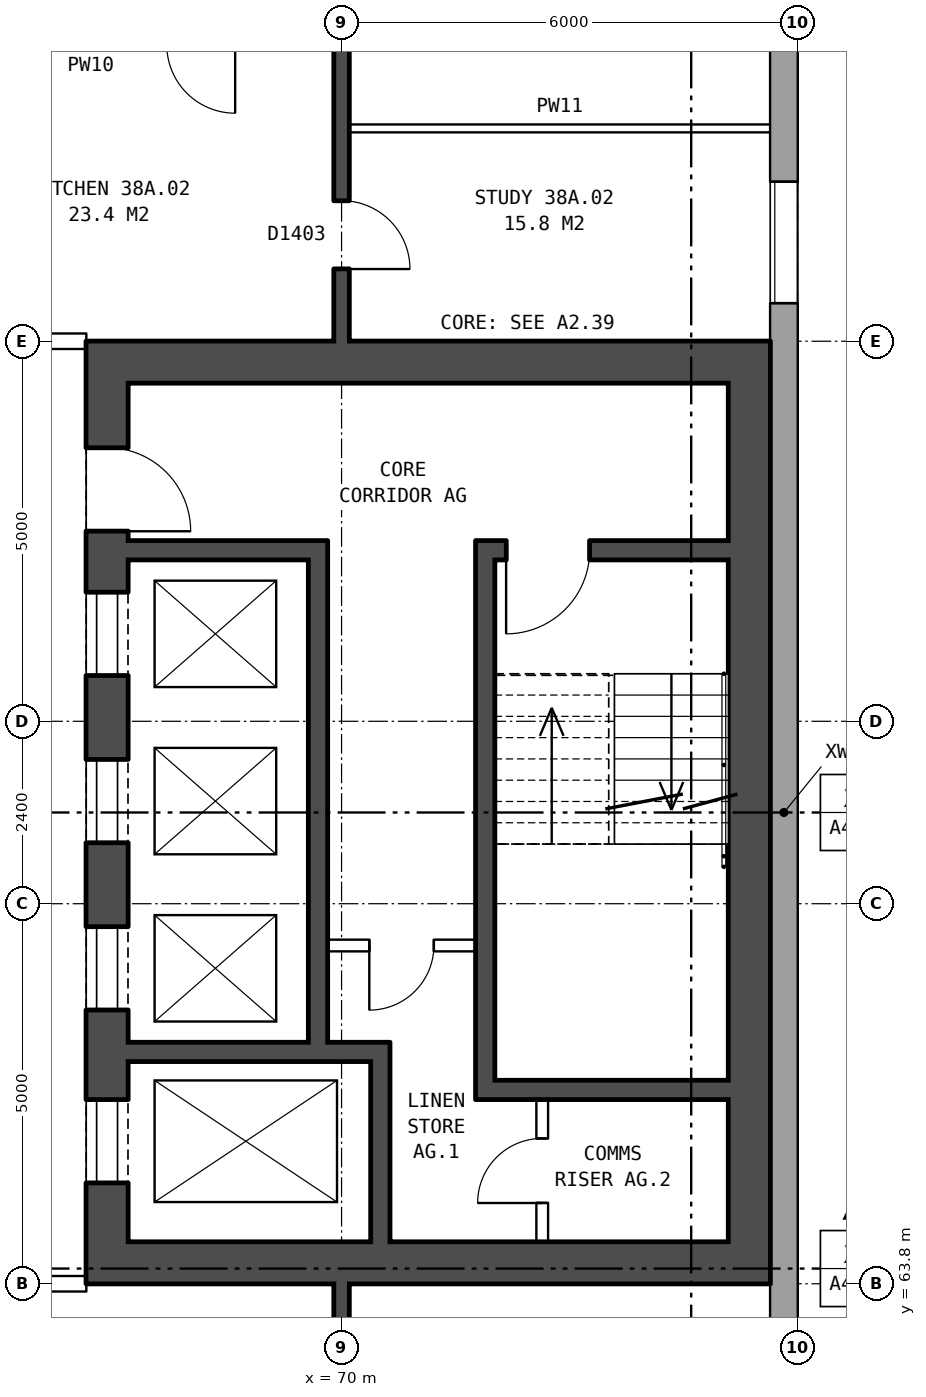
"""IFC4 building model, lengths in metres.
Left out: names, types, materials, properties, quantities, classifications, styles, units other than length and angle.
Written with IfcOpenShell. Run it as: python <this file> out.ifc"""

import sys

from ifc_helpers import new_model, si_unit, direction, frame, frame_2d, origin, place, context, subcontext, project, spatial, rectangle, extrude, element, fill, save


model = new_model("IFC4")
c1 = context("Model", 3, precision=1e-05, world=origin(), true_north=direction((0.0, 1.0)))
c2 = subcontext(c1, "Body", "Model", "MODEL_VIEW")
j1 = project(units=[si_unit("LENGTHUNIT", "METRE"), si_unit("PLANEANGLEUNIT", "RADIAN")], contexts=[c1])
p1 = place(None, origin())
s1 = spatial("IfcSite", under=j1, at=p1, CompositionType="ELEMENT")
p2 = place(p1, origin())
s2 = spatial("IfcBuilding", under=s1, at=p2, CompositionType="ELEMENT")
p3 = place(p2, frame((0.0, 0.0, 136.1)))
s3 = spatial("IfcBuildingStorey", under=s2, at=p3, CompositionType="ELEMENT", Elevation=136.1)
p4 = place(p3, frame((75.82, 57.075, 0.0), z_axis=(0.0, 0.0, 1.0), x_axis=(0.0, 1.0, 0.0)))
e1 = element("IfcWall", 1, at=p4, inside=s3, PredefinedType="STANDARD", context=c2, shape_type="SweptSolid", body=[
    extrude(rectangle(XDim=25.851, YDim=0.36, at=frame_2d((12.925, 0.0))), origin(), (0.0, 0.0, 1.0), 2.85),
])
p5 = place(p4, frame((1.075, 0.0, 0.8)))
e2 = element("IfcOpeningElement", 2, at=p5, cuts=e1, PredefinedType="OPENING", context=c2, shape_type="SweptSolid", body=[
    extrude(rectangle(XDim=1.2, YDim=1.2, at=frame_2d((0.6, 0.6))), frame((0.0, 0.19, 0.0), z_axis=(0.0, -1.0, 0.0), x_axis=(1.0, 0.0, 0.0)), (0.0, 0.0, 1.0), 0.38),
])
p6 = place(p4, frame((4.625, 0.0, 0.8)))
e3 = element("IfcOpeningElement", 3, at=p6, cuts=e1, PredefinedType="OPENING", context=c2, shape_type="SweptSolid", body=[
    extrude(rectangle(XDim=1.6, YDim=1.8, at=frame_2d((0.8, 0.9))), frame((0.0, 0.19, 0.0), z_axis=(0.0, -1.0, 0.0), x_axis=(1.0, 0.0, 0.0)), (0.0, 0.0, 1.0), 0.38),
])
p7 = place(p4, frame((19.625, 0.0, 0.8)))
e4 = element("IfcOpeningElement", 4, at=p7, cuts=e1, PredefinedType="OPENING", context=c2, shape_type="SweptSolid", body=[
    extrude(rectangle(XDim=1.6, YDim=1.8, at=frame_2d((0.8, 0.9))), frame((0.0, 0.19, 0.0), z_axis=(0.0, -1.0, 0.0), x_axis=(1.0, 0.0, 0.0)), (0.0, 0.0, 1.0), 0.38),
])
p8 = place(p4, frame((23.125, 0.0, 0.8)))
e5 = element("IfcOpeningElement", 5, at=p8, cuts=e1, PredefinedType="OPENING", context=c2, shape_type="SweptSolid", body=[
    extrude(rectangle(XDim=1.0, YDim=0.9, at=frame_2d((0.5, 0.45))), frame((0.0, 0.19, 0.0), z_axis=(0.0, -1.0, 0.0), x_axis=(1.0, 0.0, 0.0)), (0.0, 0.0, 1.0), 0.38),
])
p9 = place(p4, frame((3.675, 0.0, 1.7)))
e6 = element("IfcOpeningElement", 6, at=p9, cuts=e1, PredefinedType="OPENING", context=c2, shape_type="SweptSolid", body=[
    extrude(rectangle(XDim=0.6, YDim=0.9, at=frame_2d((0.3, 0.45))), frame((0.0, 0.19, 0.0), z_axis=(0.0, -1.0, 0.0), x_axis=(1.0, 0.0, 0.0)), (0.0, 0.0, 1.0), 0.38),
])
p10 = place(p4, frame((24.425, 0.0, 0.8)))
e7 = element("IfcOpeningElement", 7, at=p10, cuts=e1, PredefinedType="OPENING", context=c2, shape_type="SweptSolid", body=[
    extrude(rectangle(XDim=1.0, YDim=1.8, at=frame_2d((0.5, 0.9))), frame((0.0, 0.19, 0.0), z_axis=(0.0, -1.0, 0.0), x_axis=(1.0, 0.0, 0.0)), (0.0, 0.0, 1.0), 0.38),
])
p11 = place(p3, frame((66.915, 63.8, 0.0), z_axis=(0.0, 0.0, 1.0), x_axis=(0.0, 1.0, 0.0)))
e8 = element("IfcWall", 8, at=p11, inside=s3, PredefinedType="SHEAR", context=c2, shape_type="SweptSolid", body=[
    extrude(rectangle(XDim=12.4, YDim=0.55, at=frame_2d((6.2, 0.0))), origin(), (0.0, 0.0, 1.0), 2.85),
])
p12 = place(p11, frame((1.325, 0.0, 0.0)))
e9 = element("IfcOpeningElement", 9, at=p12, cuts=e8, PredefinedType="OPENING", context=c2, shape_type="SweptSolid", body=[
    extrude(rectangle(XDim=1.1, YDim=2.1, at=frame_2d((0.55, 1.05))), frame((0.0, 0.285, 0.0), z_axis=(0.0, -1.0, 0.0), x_axis=(1.0, 0.0, 0.0)), (0.0, 0.0, 1.0), 0.57),
])
p13 = place(p11, frame((3.6, 0.0, 0.0)))
e10 = element("IfcOpeningElement", 10, at=p13, cuts=e8, PredefinedType="OPENING", context=c2, shape_type="SweptSolid", body=[
    extrude(rectangle(XDim=1.1, YDim=2.1, at=frame_2d((0.55, 1.05))), frame((0.0, 0.285, 0.0), z_axis=(0.0, -1.0, 0.0), x_axis=(1.0, 0.0, 0.0)), (0.0, 0.0, 1.0), 0.57),
])
p14 = place(p11, frame((5.8, 0.0, 0.0)))
e11 = element("IfcOpeningElement", 11, at=p14, cuts=e8, PredefinedType="OPENING", context=c2, shape_type="SweptSolid", body=[
    extrude(rectangle(XDim=1.1, YDim=2.1, at=frame_2d((0.55, 1.05))), frame((0.0, 0.285, 0.0), z_axis=(0.0, -1.0, 0.0), x_axis=(1.0, 0.0, 0.0)), (0.0, 0.0, 1.0), 0.57),
])
p15 = place(p11, frame((8.0, 0.0, 0.0)))
e12 = element("IfcOpeningElement", 12, at=p15, cuts=e8, PredefinedType="OPENING", context=c2, shape_type="SweptSolid", body=[
    extrude(rectangle(XDim=1.1, YDim=2.1, at=frame_2d((0.55, 1.05))), frame((0.0, 0.285, 0.0), z_axis=(0.0, -1.0, 0.0), x_axis=(1.0, 0.0, 0.0)), (0.0, 0.0, 1.0), 0.57),
])
p16 = place(p11, frame((9.9, 0.0, 0.0)))
e13 = element("IfcOpeningElement", 13, at=p16, cuts=e8, PredefinedType="OPENING", context=c2, shape_type="SweptSolid", body=[
    extrude(rectangle(XDim=1.1, YDim=2.1, at=frame_2d((0.55, 1.05))), frame((0.0, 0.285, 0.0), z_axis=(0.0, -1.0, 0.0), x_axis=(1.0, 0.0, 0.0)), (0.0, 0.0, 1.0), 0.57),
])
p17 = place(p3, frame((75.365, 63.8, 0.0), z_axis=(0.0, 0.0, 1.0), x_axis=(0.0, 1.0, 0.0)))
e14 = element("IfcWall", 14, at=p17, inside=s3, PredefinedType="SHEAR", context=c2, shape_type="SweptSolid", body=[
    extrude(rectangle(XDim=12.4, YDim=0.55, at=frame_2d((6.2, 0.0))), origin(), (0.0, 0.0, 1.0), 2.85),
])
for number, where, z_axis, x_axis in (
    (15, (67.19, 64.075, 0.0), (0.0, 0.0, 1.0), (1.0, 0.0, 0.0)),
    (16, (67.19, 75.925, 0.0), (0.0, 0.0, 1.0), (1.0, 0.0, 0.0)),
):
    element("IfcWall", number, at=place(p3, frame(where, z_axis=z_axis, x_axis=x_axis)), inside=s3, PredefinedType="SHEAR", context=c2, shape_type="SweptSolid", body=[
        extrude(rectangle(XDim=7.9, YDim=0.55, at=frame_2d((3.95, 0.0))), origin(), (0.0, 0.0, 1.0), 2.85),
    ])
p18 = place(p3, frame((72.015, 66.35, 0.0), z_axis=(0.0, 0.0, 1.0), x_axis=(1.0, 0.0, 0.0)))
e17 = element("IfcWall", 17, at=p18, inside=s3, PredefinedType="SHEAR", context=c2, shape_type="SweptSolid", body=[
    extrude(rectangle(XDim=3.075, YDim=0.25, at=frame_2d((1.538, 0.0))), origin(), (0.0, 0.0, 1.0), 2.85),
])
p19 = place(p3, frame((67.19, 66.85, 0.0), z_axis=(0.0, 0.0, 1.0), x_axis=(1.0, 0.0, 0.0)))
e18 = element("IfcWall", 18, at=p19, inside=s3, PredefinedType="SHEAR", context=c2, shape_type="SweptSolid", body=[
    extrude(rectangle(XDim=3.445, YDim=0.25, at=frame_2d((1.723, 0.0))), origin(), (0.0, 0.0, 1.0), 2.85),
])
p20 = place(p3, frame((69.815, 68.25, 0.0), z_axis=(0.0, 0.0, 1.0), x_axis=(1.0, 0.0, 0.0)))
e19 = element("IfcWall", 19, at=p20, inside=s3, PredefinedType="PARTITIONING", context=c2, shape_type="SweptSolid", body=[
    extrude(rectangle(XDim=1.95, YDim=0.15, at=frame_2d((0.975, 0.0))), origin(), (0.0, 0.0, 1.0), 2.85),
])
p21 = place(p20, frame((0.55, 0.0, 0.0)))
e20 = element("IfcOpeningElement", 20, at=p21, cuts=e19, PredefinedType="OPENING", context=c2, shape_type="SweptSolid", body=[
    extrude(rectangle(XDim=0.85, YDim=2.1, at=frame_2d((0.425, 1.05))), frame((0.0, 0.085, 0.0), z_axis=(0.0, -1.0, 0.0), x_axis=(1.0, 0.0, 0.0)), (0.0, 0.0, 1.0), 0.17),
])
p22 = place(p3, frame((67.19, 73.45, 0.0), z_axis=(0.0, 0.0, 1.0), x_axis=(1.0, 0.0, 0.0)))
e21 = element("IfcWall", 21, at=p22, inside=s3, PredefinedType="SHEAR", context=c2, shape_type="SweptSolid", body=[
    extrude(rectangle(XDim=2.375, YDim=0.25, at=frame_2d((1.188, 0.0))), origin(), (0.0, 0.0, 1.0), 2.85),
])
p23 = place(p3, frame((72.015, 73.45, 0.0), z_axis=(0.0, 0.0, 1.0), x_axis=(1.0, 0.0, 0.0)))
e22 = element("IfcWall", 22, at=p23, inside=s3, PredefinedType="SHEAR", context=c2, shape_type="SweptSolid", body=[
    extrude(rectangle(XDim=3.075, YDim=0.25, at=frame_2d((1.538, 0.0))), origin(), (0.0, 0.0, 1.0), 2.85),
])
p24 = place(p23, frame((0.15, 0.0, 0.0)))
e23 = element("IfcOpeningElement", 23, at=p24, cuts=e22, PredefinedType="OPENING", context=c2, shape_type="SweptSolid", body=[
    extrude(rectangle(XDim=1.1, YDim=2.1, at=frame_2d((0.55, 1.05))), frame((0.0, 0.135, 0.0), z_axis=(0.0, -1.0, 0.0), x_axis=(1.0, 0.0, 0.0)), (0.0, 0.0, 1.0), 0.27),
])
p25 = place(p3, frame((69.69, 66.975, 0.0), z_axis=(0.0, 0.0, 1.0), x_axis=(0.0, 1.0, 0.0)))
e24 = element("IfcWall", 24, at=p25, inside=s3, PredefinedType="SHEAR", context=c2, shape_type="SweptSolid", body=[
    extrude(rectangle(XDim=6.6, YDim=0.25, at=frame_2d((3.3, 0.0))), origin(), (0.0, 0.0, 1.0), 2.85),
])
p26 = place(p3, frame((70.51, 64.35, 0.0), z_axis=(0.0, 0.0, 1.0), x_axis=(0.0, 1.0, 0.0)))
e25 = element("IfcWall", 25, at=p26, inside=s3, PredefinedType="SHEAR", context=c2, shape_type="SweptSolid", body=[
    extrude(rectangle(XDim=2.375, YDim=0.25, at=frame_2d((1.188, 0.0))), origin(), (0.0, 0.0, 1.0), 2.85),
])
p27 = place(p3, frame((71.89, 66.225, 0.0), z_axis=(0.0, 0.0, 1.0), x_axis=(0.0, 1.0, 0.0)))
e26 = element("IfcWall", 26, at=p27, inside=s3, PredefinedType="SHEAR", context=c2, shape_type="SweptSolid", body=[
    extrude(rectangle(XDim=7.35, YDim=0.25, at=frame_2d((3.675, 0.0))), origin(), (0.0, 0.0, 1.0), 2.85),
])
p28 = place(p3, frame((72.64, 64.35, 0.0), z_axis=(0.0, 0.0, 1.0), x_axis=(0.0, 1.0, 0.0)))
e27 = element("IfcWall", 27, at=p28, inside=s3, PredefinedType="PARTITIONING", context=c2, shape_type="SweptSolid", body=[
    extrude(rectangle(XDim=1.875, YDim=0.15, at=frame_2d((0.938, 0.0))), origin(), (0.0, 0.0, 1.0), 2.85),
])
p29 = place(p28, frame((0.512, 0.0, 0.0)))
e28 = element("IfcOpeningElement", 28, at=p29, cuts=e27, PredefinedType="OPENING", context=c2, shape_type="SweptSolid", body=[
    extrude(rectangle(XDim=0.85, YDim=2.1, at=frame_2d((0.425, 1.05))), frame((0.0, 0.085, 0.0), z_axis=(0.0, -1.0, 0.0), x_axis=(1.0, 0.0, 0.0)), (0.0, 0.0, 1.0), 0.17),
])
p30 = place(p3, frame((63.64, 63.8, 0.0), z_axis=(0.0, 0.0, 1.0), x_axis=(1.0, 0.0, 0.0)))
e29 = element("IfcWall", 29, at=p30, inside=s3, PredefinedType="PARTITIONING", context=c2, shape_type="SweptSolid", body=[
    extrude(rectangle(XDim=3.0, YDim=0.2, at=frame_2d((1.5, 0.0))), origin(), (0.0, 0.0, 1.0), 2.85),
])
p31 = place(p30, frame((1.18, 0.0, 0.0)))
e30 = element("IfcOpeningElement", 30, at=p31, cuts=e29, PredefinedType="OPENING", context=c2, shape_type="SweptSolid", body=[
    extrude(rectangle(XDim=1.0, YDim=2.1, at=frame_2d((0.5, 1.05))), frame((0.0, 0.11, 0.0), z_axis=(0.0, -1.0, 0.0), x_axis=(1.0, 0.0, 0.0)), (0.0, 0.0, 1.0), 0.22),
])
p32 = place(p3, frame((63.64, 76.2, 0.0), z_axis=(0.0, 0.0, 1.0), x_axis=(1.0, 0.0, 0.0)))
e31 = element("IfcWall", 31, at=p32, inside=s3, PredefinedType="PARTITIONING", context=c2, shape_type="SweptSolid", body=[
    extrude(rectangle(XDim=3.0, YDim=0.2, at=frame_2d((1.5, 0.0))), origin(), (0.0, 0.0, 1.0), 2.85),
])
p33 = place(p32, frame((1.18, 0.0, 0.0)))
e32 = element("IfcOpeningElement", 32, at=p33, cuts=e31, PredefinedType="OPENING", context=c2, shape_type="SweptSolid", body=[
    extrude(rectangle(XDim=1.0, YDim=2.1, at=frame_2d((0.5, 1.05))), frame((0.0, 0.11, 0.0), z_axis=(0.0, -1.0, 0.0), x_axis=(1.0, 0.0, 0.0)), (0.0, 0.0, 1.0), 0.22),
])
p34 = place(p3, frame((70.1, 79.0, 0.0), z_axis=(0.0, 0.0, 1.0), x_axis=(1.0, 0.0, 0.0)))
e33 = element("IfcWall", 33, at=p34, inside=s3, PredefinedType="PARTITIONING", context=c2, shape_type="SweptSolid", body=[
    extrude(rectangle(XDim=5.54, YDim=0.1, at=frame_2d((2.77, 0.0))), origin(), (0.0, 0.0, 1.0), 2.85),
])
p35 = place(p3, frame((70.0, 54.36, 0.0), z_axis=(0.0, 0.0, 1.0), x_axis=(0.0, 1.0, 0.0)))
e34 = element("IfcWall", 34, at=p35, inside=s3, PredefinedType="SOLIDWALL", context=c2, shape_type="SweptSolid", body=[
    extrude(rectangle(XDim=9.44, YDim=0.2, at=frame_2d((4.72, 0.0))), origin(), (0.0, 0.0, 1.0), 2.85),
])
p36 = place(p35, frame((7.04, 0.0, 0.0)))
e35 = element("IfcOpeningElement", 35, at=p36, cuts=e34, PredefinedType="OPENING", context=c2, shape_type="SweptSolid", body=[
    extrude(rectangle(XDim=0.9, YDim=2.1, at=frame_2d((0.45, 1.05))), frame((0.0, 0.11, 0.0), z_axis=(0.0, -1.0, 0.0), x_axis=(1.0, 0.0, 0.0)), (0.0, 0.0, 1.0), 0.22),
])
p37 = place(p3, frame((70.0, 76.2, 0.0), z_axis=(0.0, 0.0, 1.0), x_axis=(0.0, 1.0, 0.0)))
e36 = element("IfcWall", 36, at=p37, inside=s3, PredefinedType="SOLIDWALL", context=c2, shape_type="SweptSolid", body=[
    extrude(rectangle(XDim=9.44, YDim=0.2, at=frame_2d((4.72, 0.0))), origin(), (0.0, 0.0, 1.0), 2.85),
])
p38 = place(p37, frame((6.22, 0.0, 0.0)))
e37 = element("IfcOpeningElement", 37, at=p38, cuts=e36, PredefinedType="OPENING", context=c2, shape_type="SweptSolid", body=[
    extrude(rectangle(XDim=0.9, YDim=2.1, at=frame_2d((0.45, 1.05))), frame((0.0, 0.11, 0.0), z_axis=(0.0, -1.0, 0.0), x_axis=(1.0, 0.0, 0.0)), (0.0, 0.0, 1.0), 0.22),
])
p39 = place(p37, frame((0.95, 0.0, 0.0)))
e38 = element("IfcOpeningElement", 38, at=p39, cuts=e36, PredefinedType="OPENING", context=c2, shape_type="SweptSolid", body=[
    extrude(rectangle(XDim=0.9, YDim=2.1, at=frame_2d((0.45, 1.05))), frame((0.0, 0.11, 0.0), z_axis=(0.0, -1.0, 0.0), x_axis=(1.0, 0.0, 0.0)), (0.0, 0.0, 1.0), 0.22),
])
p40 = place(p7, origin())
e39 = element("IfcWindow", 39, at=p40, inside=s3, PartitioningType="SINGLE_PANEL", PredefinedType="WINDOW", context=c2, shape_type="SweptSolid", body=[
    extrude(rectangle(XDim=1.6, YDim=1.8, at=frame_2d((0.8, 0.9))), frame((0.0, 0.15, 0.0), z_axis=(0.0, -1.0, 0.0), x_axis=(1.0, 0.0, 0.0)), (0.0, 0.0, 1.0), 0.06),
])
fill(e4, e39)
p41 = place(p12, origin())
e40 = element("IfcDoor", 40, at=p41, inside=s3, OperationType="DOUBLE_DOOR_SLIDING", PredefinedType="DOOR", context=c2, shape_type="SweptSolid", body=[
    extrude(rectangle(XDim=1.1, YDim=2.1, at=frame_2d((0.55, 1.05))), frame((0.0, -0.21, 0.0), z_axis=(0.0, -1.0, 0.0), x_axis=(1.0, 0.0, 0.0)), (0.0, 0.0, 1.0), 0.05),
])
fill(e9, e40)
p42 = place(p13, origin())
e41 = element("IfcDoor", 41, at=p42, inside=s3, OperationType="DOUBLE_DOOR_SLIDING", PredefinedType="DOOR", context=c2, shape_type="SweptSolid", body=[
    extrude(rectangle(XDim=1.1, YDim=2.1, at=frame_2d((0.55, 1.05))), frame((0.0, -0.21, 0.0), z_axis=(0.0, -1.0, 0.0), x_axis=(1.0, 0.0, 0.0)), (0.0, 0.0, 1.0), 0.05),
])
fill(e10, e41)
p43 = place(p14, origin())
e42 = element("IfcDoor", 42, at=p43, inside=s3, OperationType="DOUBLE_DOOR_SLIDING", PredefinedType="DOOR", context=c2, shape_type="SweptSolid", body=[
    extrude(rectangle(XDim=1.1, YDim=2.1, at=frame_2d((0.55, 1.05))), frame((0.0, -0.21, 0.0), z_axis=(0.0, -1.0, 0.0), x_axis=(1.0, 0.0, 0.0)), (0.0, 0.0, 1.0), 0.05),
])
fill(e11, e42)
p44 = place(p15, origin())
e43 = element("IfcDoor", 43, at=p44, inside=s3, OperationType="DOUBLE_DOOR_SLIDING", PredefinedType="DOOR", context=c2, shape_type="SweptSolid", body=[
    extrude(rectangle(XDim=1.1, YDim=2.1, at=frame_2d((0.55, 1.05))), frame((0.0, -0.21, 0.0), z_axis=(0.0, -1.0, 0.0), x_axis=(1.0, 0.0, 0.0)), (0.0, 0.0, 1.0), 0.05),
])
fill(e12, e43)
p45 = place(p16, frame((1.1, 0.0, 0.0), z_axis=(0.0, 0.0, 1.0), x_axis=(-1.0, 0.0, 0.0)))
e44 = element("IfcDoor", 44, at=p45, inside=s3, OperationType="SINGLE_SWING_RIGHT", PredefinedType="DOOR", context=c2, shape_type="SweptSolid", body=[
    extrude(rectangle(XDim=1.1, YDim=2.1, at=frame_2d((0.55, 1.05))), frame((0.0, 0.26, 0.0), z_axis=(0.0, -1.0, 0.0), x_axis=(1.0, 0.0, 0.0)), (0.0, 0.0, 1.0), 0.05),
])
fill(e13, e44)
p46 = place(p24, frame((1.1, 0.0, 0.0), z_axis=(0.0, 0.0, 1.0), x_axis=(-1.0, 0.0, 0.0)))
e45 = element("IfcDoor", 45, at=p46, inside=s3, OperationType="SINGLE_SWING_RIGHT", PredefinedType="DOOR", context=c2, shape_type="SweptSolid", body=[
    extrude(rectangle(XDim=1.1, YDim=2.1, at=frame_2d((0.55, 1.05))), frame((0.0, 0.025, 0.0), z_axis=(0.0, -1.0, 0.0), x_axis=(1.0, 0.0, 0.0)), (0.0, 0.0, 1.0), 0.05),
])
fill(e23, e45)
p47 = place(p21, frame((0.85, 0.0, 0.0), z_axis=(0.0, 0.0, 1.0), x_axis=(-1.0, 0.0, 0.0)))
e46 = element("IfcDoor", 46, at=p47, inside=s3, OperationType="SINGLE_SWING_RIGHT", PredefinedType="DOOR", context=c2, shape_type="SweptSolid", body=[
    extrude(rectangle(XDim=0.85, YDim=2.1, at=frame_2d((0.425, 1.05))), frame((0.0, 0.025, 0.0), z_axis=(0.0, -1.0, 0.0), x_axis=(1.0, 0.0, 0.0)), (0.0, 0.0, 1.0), 0.05),
])
fill(e20, e46)
p48 = place(p29, origin())
e47 = element("IfcDoor", 47, at=p48, inside=s3, OperationType="SINGLE_SWING_LEFT", PredefinedType="DOOR", context=c2, shape_type="SweptSolid", body=[
    extrude(rectangle(XDim=0.85, YDim=2.1, at=frame_2d((0.425, 1.05))), frame((0.0, 0.025, 0.0), z_axis=(0.0, -1.0, 0.0), x_axis=(1.0, 0.0, 0.0)), (0.0, 0.0, 1.0), 0.05),
])
fill(e28, e47)
p49 = place(p39, frame((0.9, 0.0, 0.0), z_axis=(0.0, 0.0, 1.0), x_axis=(-1.0, 0.0, 0.0)))
e48 = element("IfcDoor", 48, at=p49, inside=s3, OperationType="SINGLE_SWING_RIGHT", PredefinedType="DOOR", context=c2, shape_type="SweptSolid", body=[
    extrude(rectangle(XDim=0.9, YDim=2.1, at=frame_2d((0.45, 1.05))), frame((0.0, 0.025, 0.0), z_axis=(0.0, -1.0, 0.0), x_axis=(1.0, 0.0, 0.0)), (0.0, 0.0, 1.0), 0.05),
])
fill(e38, e48)
save(model, sys.argv[1])
